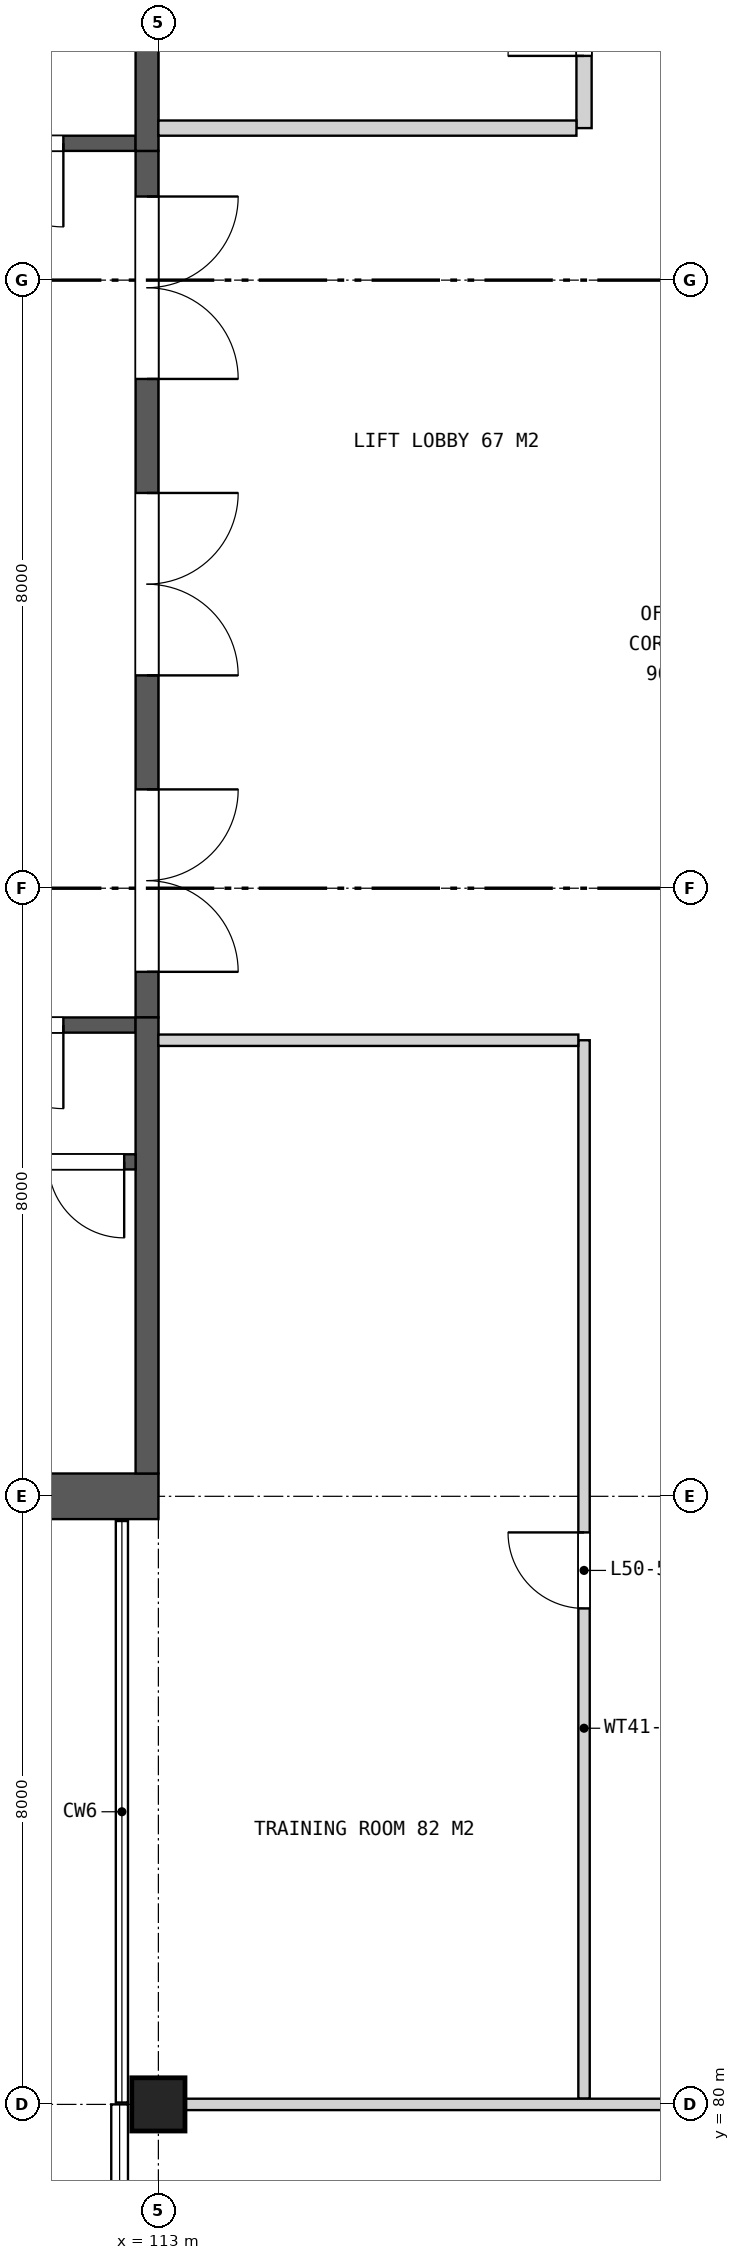
"""IFC4 building model, lengths in metres.
Left out: names, types, materials, properties, quantities, classifications, styles, units other than length and angle.
Written with IfcOpenShell. Run it as: python <this file> out.ifc"""

import sys

from ifc_helpers import new_model, si_unit, direction, frame, frame_2d, origin, origin_2d, place, context, subcontext, project, spatial, rectangle, extrude, element, fill, save


model = new_model("IFC4")
c1 = context("Model", 3, precision=1e-05, world=origin(), true_north=direction((0.0, 1.0)))
c2 = subcontext(c1, "Body", "Model", "MODEL_VIEW")
j1 = project(units=[si_unit("LENGTHUNIT", "METRE"), si_unit("PLANEANGLEUNIT", "RADIAN")], contexts=[c1])
p1 = place(None, origin())
s1 = spatial("IfcSite", under=j1, at=p1, CompositionType="ELEMENT")
p2 = place(p1, origin())
s2 = spatial("IfcBuilding", under=s1, at=p2, CompositionType="ELEMENT")
p3 = place(p2, frame((0.0, 0.0, 233.5)))
s3 = spatial("IfcBuildingStorey", under=s2, at=p3, CompositionType="ELEMENT", Elevation=233.5)
p4 = place(p3, frame((113.0, 80.0, 0.0), z_axis=(0.0, 0.0, 1.0), x_axis=(1.0, 0.0, 0.0)))
e1 = element("IfcColumn", 1, at=p4, inside=s3, PredefinedType="COLUMN", context=c2, shape_type="SweptSolid", body=[
    extrude(rectangle(XDim=0.7, YDim=0.7, at=origin_2d()), origin(), (0.0, 0.0, 1.0), 4.2),
])
p5 = place(p3, frame((113.0, 88.0, 0.0), z_axis=(0.0, 0.0, 1.0), x_axis=(-1.0, 0.0, 0.0)))
e2 = element("IfcWall", 2, at=p5, inside=s3, PredefinedType="SHEAR", context=c2, shape_type="SweptSolid", body=[
    extrude(rectangle(XDim=7.1, YDim=0.6, at=frame_2d((3.55, 0.0))), origin(), (0.0, 0.0, 1.0), 4.2),
])
p6 = place(p3, frame((112.85, 105.7, 0.0), z_axis=(0.0, 0.0, 1.0), x_axis=(0.0, -1.0, 0.0)))
e3 = element("IfcWall", 3, at=p6, inside=s3, PredefinedType="SHEAR", context=c2, shape_type="SweptSolid", body=[
    extrude(rectangle(XDim=11.4, YDim=0.3, at=frame_2d((5.7, 0.0))), origin(), (0.0, 0.0, 1.0), 4.2),
])
p7 = place(p6, frame((0.6, 0.0, 0.0)))
e4 = element("IfcOpeningElement", 4, at=p7, cuts=e3, PredefinedType="OPENING", context=c2, shape_type="SweptSolid", body=[
    extrude(rectangle(XDim=2.4, YDim=2.4, at=frame_2d((1.2, 1.2))), frame((0.0, 0.16, 0.0), z_axis=(0.0, -1.0, 0.0), x_axis=(1.0, 0.0, 0.0)), (0.0, 0.0, 1.0), 0.32),
])
p8 = place(p6, frame((4.5, 0.0, 0.0)))
e5 = element("IfcOpeningElement", 5, at=p8, cuts=e3, PredefinedType="OPENING", context=c2, shape_type="SweptSolid", body=[
    extrude(rectangle(XDim=2.4, YDim=2.4, at=frame_2d((1.2, 1.2))), frame((0.0, 0.16, 0.0), z_axis=(0.0, -1.0, 0.0), x_axis=(1.0, 0.0, 0.0)), (0.0, 0.0, 1.0), 0.32),
])
p9 = place(p6, frame((8.4, 0.0, 0.0)))
e6 = element("IfcOpeningElement", 6, at=p9, cuts=e3, PredefinedType="OPENING", context=c2, shape_type="SweptSolid", body=[
    extrude(rectangle(XDim=2.4, YDim=2.4, at=frame_2d((1.2, 1.2))), frame((0.0, 0.16, 0.0), z_axis=(0.0, -1.0, 0.0), x_axis=(1.0, 0.0, 0.0)), (0.0, 0.0, 1.0), 0.32),
])
p10 = place(p3, frame((112.7, 94.2, 0.0), z_axis=(0.0, 0.0, 1.0), x_axis=(-1.0, 0.0, 0.0)))
e7 = element("IfcWall", 7, at=p10, inside=s3, PredefinedType="SHEAR", context=c2, shape_type="SweptSolid", body=[
    extrude(rectangle(XDim=15.4, YDim=0.2, at=frame_2d((7.7, 0.0))), origin(), (0.0, 0.0, 1.0), 4.2),
])
p11 = place(p10, frame((0.95, 0.0, 0.0)))
e8 = element("IfcOpeningElement", 8, at=p11, cuts=e7, PredefinedType="OPENING", context=c2, shape_type="SweptSolid", body=[
    extrude(rectangle(XDim=1.1, YDim=2.1, at=frame_2d((0.55, 1.05))), frame((0.0, 0.11, 0.0), z_axis=(0.0, -1.0, 0.0), x_axis=(1.0, 0.0, 0.0)), (0.0, 0.0, 1.0), 0.22),
])
p12 = place(p3, frame((112.85, 94.3, 0.0), z_axis=(0.0, 0.0, 1.0), x_axis=(0.0, -1.0, 0.0)))
e9 = element("IfcWall", 9, at=p12, inside=s3, PredefinedType="SHEAR", context=c2, shape_type="SweptSolid", body=[
    extrude(rectangle(XDim=6.0, YDim=0.3, at=frame_2d((3.0, 0.0))), origin(), (0.0, 0.0, 1.0), 4.2),
])
p13 = place(p3, frame((112.7, 92.4, 0.0), z_axis=(0.0, 0.0, 1.0), x_axis=(-1.0, 0.0, 0.0)))
e10 = element("IfcWall", 10, at=p13, inside=s3, PredefinedType="SHEAR", context=c2, shape_type="SweptSolid", body=[
    extrude(rectangle(XDim=6.8, YDim=0.2, at=frame_2d((3.4, 0.0))), origin(), (0.0, 0.0, 1.0), 4.2),
])
p14 = place(p13, frame((0.15, 0.0, 0.0)))
e11 = element("IfcOpeningElement", 11, at=p14, cuts=e10, PredefinedType="OPENING", context=c2, shape_type="SweptSolid", body=[
    extrude(rectangle(XDim=1.0, YDim=2.1, at=frame_2d((0.5, 1.05))), frame((0.0, 0.11, 0.0), z_axis=(0.0, -1.0, 0.0), x_axis=(1.0, 0.0, 0.0)), (0.0, 0.0, 1.0), 0.22),
])
p15 = place(p3, frame((112.7, 105.8, 0.0), z_axis=(0.0, 0.0, 1.0), x_axis=(-1.0, 0.0, 0.0)))
e12 = element("IfcWall", 12, at=p15, inside=s3, PredefinedType="SHEAR", context=c2, shape_type="SweptSolid", body=[
    extrude(rectangle(XDim=15.4, YDim=0.2, at=frame_2d((7.7, 0.0))), origin(), (0.0, 0.0, 1.0), 4.2),
])
p16 = place(p15, frame((0.95, 0.0, 0.0)))
e13 = element("IfcOpeningElement", 13, at=p16, cuts=e12, PredefinedType="OPENING", context=c2, shape_type="SweptSolid", body=[
    extrude(rectangle(XDim=1.1, YDim=2.1, at=frame_2d((0.55, 1.05))), frame((0.0, 0.11, 0.0), z_axis=(0.0, -1.0, 0.0), x_axis=(1.0, 0.0, 0.0)), (0.0, 0.0, 1.0), 0.22),
])
p17 = place(p3, frame((112.85, 111.7, 0.0), z_axis=(0.0, 0.0, 1.0), x_axis=(0.0, -1.0, 0.0)))
e14 = element("IfcWall", 14, at=p17, inside=s3, PredefinedType="SHEAR", context=c2, shape_type="SweptSolid", body=[
    extrude(rectangle(XDim=6.0, YDim=0.3, at=frame_2d((3.0, 0.0))), origin(), (0.0, 0.0, 1.0), 4.2),
])
p18 = place(p3, frame((118.6, 80.075, 0.0), z_axis=(0.0, 0.0, 1.0), x_axis=(0.0, 1.0, 0.0)))
e15 = element("IfcWall", 15, at=p18, inside=s3, PredefinedType="PARTITIONING", context=c2, shape_type="SweptSolid", body=[
    extrude(rectangle(XDim=13.925, YDim=0.15, at=frame_2d((6.962, 0.0))), origin(), (0.0, 0.0, 1.0), 3.255),
])
p19 = place(p18, frame((6.45, 0.0, 0.0)))
e16 = element("IfcOpeningElement", 16, at=p19, cuts=e15, PredefinedType="OPENING", context=c2, shape_type="SweptSolid", body=[
    extrude(rectangle(XDim=1.0, YDim=2.1, at=frame_2d((0.5, 1.05))), frame((0.0, 0.085, 0.0), z_axis=(0.0, -1.0, 0.0), x_axis=(1.0, 0.0, 0.0)), (0.0, 0.0, 1.0), 0.17),
])
p20 = place(p3, frame((118.6, 106.0, 0.0), z_axis=(0.0, 0.0, 1.0), x_axis=(0.0, 1.0, 0.0)))
e17 = element("IfcWall", 17, at=p20, inside=s3, PredefinedType="SOLIDWALL", context=c2, shape_type="SweptSolid", body=[
    extrude(rectangle(XDim=14.0, YDim=0.2, at=frame_2d((7.0, 0.0))), origin(), (0.0, 0.0, 1.0), 3.255),
])
p21 = place(p20, frame((0.95, 0.0, 0.0)))
e18 = element("IfcOpeningElement", 18, at=p21, cuts=e17, PredefinedType="OPENING", context=c2, shape_type="SweptSolid", body=[
    extrude(rectangle(XDim=1.0, YDim=2.1, at=frame_2d((0.5, 1.05))), frame((0.0, 0.11, 0.0), z_axis=(0.0, -1.0, 0.0), x_axis=(1.0, 0.0, 0.0)), (0.0, 0.0, 1.0), 0.22),
])
p22 = place(p20, frame((3.95, 0.0, 0.0)))
e19 = element("IfcOpeningElement", 19, at=p22, cuts=e17, PredefinedType="OPENING", context=c2, shape_type="SweptSolid", body=[
    extrude(rectangle(XDim=1.0, YDim=2.1, at=frame_2d((0.5, 1.05))), frame((0.0, 0.11, 0.0), z_axis=(0.0, -1.0, 0.0), x_axis=(1.0, 0.0, 0.0)), (0.0, 0.0, 1.0), 0.22),
])
p23 = place(p20, frame((9.45, 0.0, 0.0)))
e20 = element("IfcOpeningElement", 20, at=p23, cuts=e17, PredefinedType="OPENING", context=c2, shape_type="SweptSolid", body=[
    extrude(rectangle(XDim=1.0, YDim=2.1, at=frame_2d((0.5, 1.05))), frame((0.0, 0.11, 0.0), z_axis=(0.0, -1.0, 0.0), x_axis=(1.0, 0.0, 0.0)), (0.0, 0.0, 1.0), 0.22),
])
p24 = place(p3, frame((112.68, 80.0, 0.0), z_axis=(0.0, 0.0, 1.0), x_axis=(1.0, 0.0, 0.0)))
e21 = element("IfcWall", 21, at=p24, inside=s3, PredefinedType="PARTITIONING", context=c2, shape_type="SweptSolid", body=[
    extrude(rectangle(XDim=24.64, YDim=0.15, at=frame_2d((12.32, 0.0))), origin(), (0.0, 0.0, 1.0), 3.255),
])
p25 = place(p24, frame((11.37, 0.0, 0.0)))
e22 = element("IfcOpeningElement", 22, at=p25, cuts=e21, PredefinedType="OPENING", context=c2, shape_type="SweptSolid", body=[
    extrude(rectangle(XDim=1.8, YDim=2.1, at=frame_2d((0.9, 1.05))), frame((0.0, 0.085, 0.0), z_axis=(0.0, -1.0, 0.0), x_axis=(1.0, 0.0, 0.0)), (0.0, 0.0, 1.0), 0.17),
])
p26 = place(p24, frame((16.97, 0.0, 0.0)))
e23 = element("IfcOpeningElement", 23, at=p26, cuts=e21, PredefinedType="OPENING", context=c2, shape_type="SweptSolid", body=[
    extrude(rectangle(XDim=1.0, YDim=2.1, at=frame_2d((0.5, 1.05))), frame((0.0, 0.085, 0.0), z_axis=(0.0, -1.0, 0.0), x_axis=(1.0, 0.0, 0.0)), (0.0, 0.0, 1.0), 0.17),
])
p27 = place(p3, frame((113.0, 94.0, 0.0), z_axis=(0.0, 0.0, 1.0), x_axis=(1.0, 0.0, 0.0)))
e24 = element("IfcWall", 24, at=p27, inside=s3, PredefinedType="PARTITIONING", context=c2, shape_type="SweptSolid", body=[
    extrude(rectangle(XDim=5.525, YDim=0.15, at=frame_2d((2.762, 0.0))), origin(), (0.0, 0.0, 1.0), 3.255),
])
p28 = place(p3, frame((113.0, 106.0, 0.0), z_axis=(0.0, 0.0, 1.0), x_axis=(1.0, 0.0, 0.0)))
e25 = element("IfcWall", 25, at=p28, inside=s3, PredefinedType="SOLIDWALL", context=c2, shape_type="SweptSolid", body=[
    extrude(rectangle(XDim=5.5, YDim=0.2, at=frame_2d((2.75, 0.0))), origin(), (0.0, 0.0, 1.0), 3.255),
])
p29 = place(p7, origin())
e26 = element("IfcDoor", 26, at=p29, inside=s3, OperationType="DOUBLE_DOOR_SINGLE_SWING", PredefinedType="DOOR", context=c2, shape_type="SweptSolid", body=[
    extrude(rectangle(XDim=2.4, YDim=2.4, at=frame_2d((1.2, 1.2))), frame((0.0, 0.025, 0.0), z_axis=(0.0, -1.0, 0.0), x_axis=(1.0, 0.0, 0.0)), (0.0, 0.0, 1.0), 0.05),
])
fill(e4, e26)
p30 = place(p8, origin())
e27 = element("IfcDoor", 27, at=p30, inside=s3, OperationType="DOUBLE_DOOR_SINGLE_SWING", PredefinedType="DOOR", context=c2, shape_type="SweptSolid", body=[
    extrude(rectangle(XDim=2.4, YDim=2.4, at=frame_2d((1.2, 1.2))), frame((0.0, 0.025, 0.0), z_axis=(0.0, -1.0, 0.0), x_axis=(1.0, 0.0, 0.0)), (0.0, 0.0, 1.0), 0.05),
])
fill(e5, e27)
p31 = place(p9, origin())
e28 = element("IfcDoor", 28, at=p31, inside=s3, OperationType="DOUBLE_DOOR_SINGLE_SWING", PredefinedType="DOOR", context=c2, shape_type="SweptSolid", body=[
    extrude(rectangle(XDim=2.4, YDim=2.4, at=frame_2d((1.2, 1.2))), frame((0.0, 0.025, 0.0), z_axis=(0.0, -1.0, 0.0), x_axis=(1.0, 0.0, 0.0)), (0.0, 0.0, 1.0), 0.05),
])
fill(e6, e28)
p32 = place(p11, origin())
e29 = element("IfcDoor", 29, at=p32, inside=s3, OperationType="SINGLE_SWING_LEFT", PredefinedType="DOOR", context=c2, shape_type="SweptSolid", body=[
    extrude(rectangle(XDim=1.1, YDim=2.1, at=frame_2d((0.55, 1.05))), frame((0.0, 0.025, 0.0), z_axis=(0.0, -1.0, 0.0), x_axis=(1.0, 0.0, 0.0)), (0.0, 0.0, 1.0), 0.05),
])
fill(e8, e29)
p33 = place(p14, origin())
e30 = element("IfcDoor", 30, at=p33, inside=s3, OperationType="SINGLE_SWING_LEFT", PredefinedType="DOOR", context=c2, shape_type="SweptSolid", body=[
    extrude(rectangle(XDim=1.0, YDim=2.1, at=frame_2d((0.5, 1.05))), frame((0.0, 0.025, 0.0), z_axis=(0.0, -1.0, 0.0), x_axis=(1.0, 0.0, 0.0)), (0.0, 0.0, 1.0), 0.05),
])
fill(e11, e30)
p34 = place(p16, origin())
e31 = element("IfcDoor", 31, at=p34, inside=s3, OperationType="SINGLE_SWING_LEFT", PredefinedType="DOOR", context=c2, shape_type="SweptSolid", body=[
    extrude(rectangle(XDim=1.1, YDim=2.1, at=frame_2d((0.55, 1.05))), frame((0.0, 0.025, 0.0), z_axis=(0.0, -1.0, 0.0), x_axis=(1.0, 0.0, 0.0)), (0.0, 0.0, 1.0), 0.05),
])
fill(e13, e31)
p35 = place(p21, origin())
e32 = element("IfcDoor", 32, at=p35, inside=s3, OperationType="SINGLE_SWING_LEFT", PredefinedType="DOOR", context=c2, shape_type="SweptSolid", body=[
    extrude(rectangle(XDim=1.0, YDim=2.1, at=frame_2d((0.5, 1.05))), frame((0.0, 0.025, 0.0), z_axis=(0.0, -1.0, 0.0), x_axis=(1.0, 0.0, 0.0)), (0.0, 0.0, 1.0), 0.05),
])
fill(e18, e32)
p36 = place(p19, origin())
e33 = element("IfcDoor", 33, at=p36, inside=s3, OperationType="SINGLE_SWING_RIGHT", PredefinedType="DOOR", context=c2, shape_type="SweptSolid", body=[
    extrude(rectangle(XDim=1.0, YDim=2.1, at=frame_2d((0.5, 1.05))), frame((0.0, 0.025, 0.0), z_axis=(0.0, -1.0, 0.0), x_axis=(1.0, 0.0, 0.0)), (0.0, 0.0, 1.0), 0.05),
])
fill(e16, e33)
save(model, sys.argv[1])
